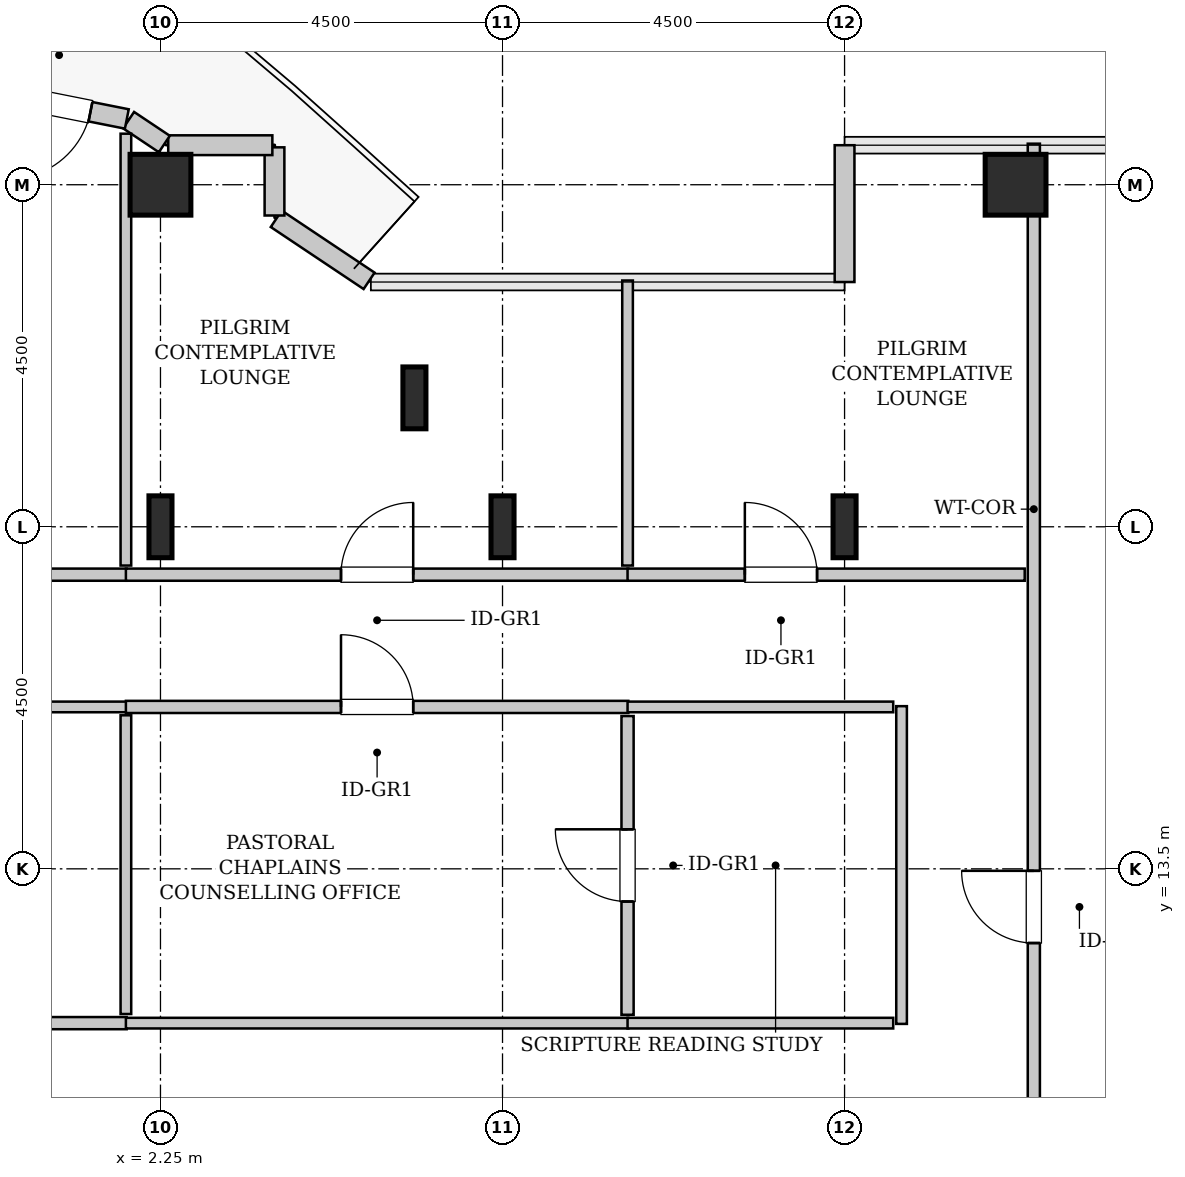
"""IFC4 building model, lengths in metres.
Left out: names, types, materials, properties, quantities, classifications, styles, units other than length and angle.
Written with IfcOpenShell. Run it as: python <this file> out.ifc"""

import sys

from ifc_helpers import new_model, si_unit, direction, frame, frame_2d, origin, origin_2d, place, context, subcontext, project, spatial, rectangle, hollow_rectangle, i_section, extrude, source, transform, mapped, element, fill, save


model = new_model("IFC4")
c1 = context("Model", 3, precision=1e-05, world=origin(), true_north=direction((0.0, 1.0)))
c2 = subcontext(c1, "Body", "Model", "MODEL_VIEW")
j1 = project(units=[si_unit("LENGTHUNIT", "METRE"), si_unit("PLANEANGLEUNIT", "RADIAN")], contexts=[c1])
p1 = place(None, origin())
s1 = spatial("IfcSite", under=j1, at=p1, CompositionType="ELEMENT")
p2 = place(p1, origin())
s2 = spatial("IfcBuilding", under=s1, at=p2, CompositionType="ELEMENT")
p3 = place(p2, frame((0.0, 0.0, 186.8)))
s3 = spatial("IfcBuildingStorey", under=s2, at=p3, CompositionType="ELEMENT", Elevation=186.8)
m1 = source(origin(), c2, "Body", "SweptSolid", [
    extrude(i_section(OverallWidth=0.303, OverallDepth=0.814, WebThickness=0.021, FlangeThickness=0.04, FilletRadius=0.03, at=origin_2d()), origin(), (0.0, 0.0, 1.0), 3.8),
])
p4 = place(p3, frame((2.25, 18.0, 0.0), z_axis=(0.0, 0.0, 1.0), x_axis=(1.0, 0.0, 0.0)))
e1 = element("IfcColumn", 1, at=p4, inside=s3, PredefinedType="COLUMN", context=c2, shape_type="MappedRepresentation", body=[
    mapped(m1, transform((0.0, 0.0, 0.0), x_axis=(1.0, 0.0, 0.0), y_axis=(0.0, 1.0, 0.0), z_axis=(0.0, 0.0, 1.0), scale=1.0)),
])
m2 = source(origin(), c2, "Body", "SweptSolid", [
    extrude(hollow_rectangle(XDim=0.8, YDim=0.8, WallThickness=0.04, InnerFilletRadius=0.04, OuterFilletRadius=0.08, at=origin_2d()), origin(), (0.0, 0.0, 1.0), 3.8),
])
p5 = place(p3, frame((2.25, 22.5, 0.0), z_axis=(0.0, 0.0, 1.0), x_axis=(1.0, 0.0, 0.0)))
e2 = element("IfcColumn", 2, at=p5, inside=s3, PredefinedType="COLUMN", context=c2, shape_type="MappedRepresentation", body=[
    mapped(m2, transform((0.0, 0.0, 0.0), x_axis=(1.0, 0.0, 0.0), y_axis=(0.0, 1.0, 0.0), z_axis=(0.0, 0.0, 1.0), scale=1.0)),
])
for number, where, z_axis, x_axis in (
    (3, (5.591, 19.696, 0.0), (0.0, 0.0, 1.0), (1.0, 0.0, 0.0)),
    (4, (6.75, 18.0, 0.0), (0.0, 0.0, 1.0), (1.0, 0.0, 0.0)),
    (5, (11.25, 18.0, 0.0), (0.0, 0.0, 1.0), (1.0, 0.0, 0.0)),
):
    element("IfcColumn", number, at=place(p3, frame(where, z_axis=z_axis, x_axis=x_axis)), inside=s3, PredefinedType="COLUMN", context=c2, shape_type="MappedRepresentation", body=[
        mapped(m1, transform((0.0, 0.0, 0.0), x_axis=(1.0, 0.0, 0.0), y_axis=(0.0, 1.0, 0.0), z_axis=(0.0, 0.0, 1.0), scale=1.0)),
    ])
p6 = place(p3, frame((13.5, 22.5, 0.0), z_axis=(0.0, 0.0, 1.0), x_axis=(1.0, 0.0, 0.0)))
e6 = element("IfcColumn", 6, at=p6, inside=s3, PredefinedType="COLUMN", context=c2, shape_type="MappedRepresentation", body=[
    mapped(m2, transform((0.0, 0.0, 0.0), x_axis=(1.0, 0.0, 0.0), y_axis=(0.0, 1.0, 0.0), z_axis=(0.0, 0.0, 1.0), scale=1.0)),
])
m3 = source(origin(), c2, "Body", "SweptSolid", [
    extrude(rectangle(XDim=1.8, YDim=0.26, at=frame_2d((0.9, 0.0))), origin(), (0.0, 0.0, 1.0), 3.55),
])
p7 = place(p3, frame((11.25, 23.02, 0.0), z_axis=(0.0, 0.0, 1.0), x_axis=(0.0, -1.0, 0.0)))
e7 = element("IfcWall", 7, at=p7, inside=s3, PredefinedType="SOLIDWALL", context=c2, shape_type="MappedRepresentation", body=[
    mapped(m3, transform((0.0, 0.0, 0.0), x_axis=(1.0, 0.0, 0.0), y_axis=(0.0, 1.0, 0.0), z_axis=(0.0, 0.0, 1.0), scale=1.0)),
])
m4 = source(origin(), c2, "Body", "SweptSolid", [
    extrude(rectangle(XDim=1.469, YDim=0.26, at=frame_2d((0.734, 0.0))), origin(), (0.0, 0.0, 1.0), 3.55),
])
p8 = place(p3, frame((4.995, 21.236, 0.0), z_axis=(0.0, 0.0, 1.0), x_axis=(-0.831461760506, 0.555581983884, 0.0)))
e8 = element("IfcWall", 8, at=p8, inside=s3, PredefinedType="SOLIDWALL", context=c2, shape_type="MappedRepresentation", body=[
    mapped(m4, transform((0.0, 0.0, 0.0), x_axis=(1.0, 0.0, 0.0), y_axis=(0.0, 1.0, 0.0), z_axis=(0.0, 0.0, 1.0), scale=1.0)),
])
m5 = source(origin(), c2, "Body", "SweptSolid", [
    extrude(rectangle(XDim=0.897, YDim=0.26, at=frame_2d((0.448, 0.0))), origin(), (0.0, 0.0, 1.0), 3.55),
])
p9 = place(p3, frame((3.75, 22.095, 0.0), z_axis=(0.0, 0.0, 1.0), x_axis=(0.0, 1.0, 0.0)))
e9 = element("IfcWall", 9, at=p9, inside=s3, PredefinedType="SOLIDWALL", context=c2, shape_type="MappedRepresentation", body=[
    mapped(m5, transform((0.0, 0.0, 0.0), x_axis=(1.0, 0.0, 0.0), y_axis=(0.0, 1.0, 0.0), z_axis=(0.0, 0.0, 1.0), scale=1.0)),
])
m6 = source(origin(), c2, "Body", "SweptSolid", [
    extrude(rectangle(XDim=1.37, YDim=0.26, at=frame_2d((0.685, 0.0))), origin(), (0.0, 0.0, 1.0), 3.55),
])
p10 = place(p3, frame((3.722, 23.02, 0.0), z_axis=(0.0, 0.0, 1.0), x_axis=(-1.0, 0.0, 0.0)))
e10 = element("IfcWall", 10, at=p10, inside=s3, PredefinedType="SOLIDWALL", context=c2, shape_type="MappedRepresentation", body=[
    mapped(m6, transform((0.0, 0.0, 0.0), x_axis=(1.0, 0.0, 0.0), y_axis=(0.0, 1.0, 0.0), z_axis=(0.0, 0.0, 1.0), scale=1.0)),
])
m7 = source(origin(), c2, "Body", "SweptSolid", [
    extrude(rectangle(XDim=0.565, YDim=0.26, at=frame_2d((0.283, 0.0))), origin(), (0.0, 0.0, 1.0), 3.55),
])
p11 = place(p3, frame((2.301, 23.036, 0.0), z_axis=(0.0, 0.0, 1.0), x_axis=(-0.831651492666, 0.555297933317, 0.0)))
e11 = element("IfcWall", 11, at=p11, inside=s3, PredefinedType="SOLIDWALL", context=c2, shape_type="MappedRepresentation", body=[
    mapped(m7, transform((0.0, 0.0, 0.0), x_axis=(1.0, 0.0, 0.0), y_axis=(0.0, 1.0, 0.0), z_axis=(0.0, 0.0, 1.0), scale=1.0)),
])
m8 = source(origin(), c2, "Body", "SweptSolid", [
    extrude(rectangle(XDim=4.137, YDim=0.26, at=frame_2d((2.068, 0.0))), origin(), (0.0, 0.0, 1.0), 3.55),
])
p12 = place(p3, frame((1.807, 23.365, 0.0), z_axis=(0.0, 0.0, 1.0), x_axis=(-0.980782170794, 0.195105954428, 0.0)))
e12 = element("IfcWall", 12, at=p12, inside=s3, PredefinedType="SOLIDWALL", context=c2, shape_type="MappedRepresentation", body=[
    mapped(m8, transform((0.0, 0.0, 0.0), x_axis=(1.0, 0.0, 0.0), y_axis=(0.0, 1.0, 0.0), z_axis=(0.0, 0.0, 1.0), scale=1.0)),
])
p13 = place(p12, frame((0.488, 0.0, 0.0)))
e13 = element("IfcOpeningElement", 13, at=p13, cuts=e12, PredefinedType="OPENING", context=c2, shape_type="SweptSolid", body=[
    extrude(rectangle(XDim=1.1, YDim=2.2, at=frame_2d((0.55, 1.1))), frame((0.0, 0.14, 0.0), z_axis=(0.0, -1.0, 0.0), x_axis=(1.0, 0.0, 0.0)), (0.0, 0.0, 1.0), 0.28),
])
m9 = source(origin(), c2, "Body", "SweptSolid", [
    extrude(rectangle(XDim=14.453, YDim=0.16, at=frame_2d((7.226, 0.0))), origin(), (0.0, 0.0, 1.0), 3.535),
])
p14 = place(p3, frame((13.74, 8.587, 0.0), z_axis=(0.0, 0.0, 1.0), x_axis=(0.0, 1.0, 0.0)))
e14 = element("IfcWall", 14, at=p14, inside=s3, PredefinedType="PARTITIONING", context=c2, shape_type="MappedRepresentation", body=[
    mapped(m9, transform((0.0, 0.0, 0.0), x_axis=(1.0, 0.0, 0.0), y_axis=(0.0, 1.0, 0.0), z_axis=(0.0, 0.0, 1.0), scale=1.0)),
])
p15 = place(p14, frame((3.936, 0.0, 0.0)))
e15 = element("IfcOpeningElement", 15, at=p15, cuts=e14, PredefinedType="OPENING", context=c2, shape_type="SweptSolid", body=[
    extrude(rectangle(XDim=0.95, YDim=2.1, at=frame_2d((0.475, 1.05))), frame((0.0, 0.09, 0.0), z_axis=(0.0, -1.0, 0.0), x_axis=(1.0, 0.0, 0.0)), (0.0, 0.0, 1.0), 0.18),
])
m10 = source(origin(), c2, "Body", "SweptSolid", [
    extrude(rectangle(XDim=13.815, YDim=0.16, at=frame_2d((6.907, 0.0))), origin(), (0.0, 0.0, 1.0), 3.535),
])
p16 = place(p3, frame((-12.01, 11.47, 0.0), z_axis=(0.0, 0.0, 1.0), x_axis=(1.0, 0.0, 0.0)))
e16 = element("IfcWall", 16, at=p16, inside=s3, PredefinedType="PARTITIONING", context=c2, shape_type="MappedRepresentation", body=[
    mapped(m10, transform((0.0, 0.0, 0.0), x_axis=(1.0, 0.0, 0.0), y_axis=(0.0, 1.0, 0.0), z_axis=(0.0, 0.0, 1.0), scale=1.0)),
])
p17 = place(p16, frame((6.433, 0.0, 0.0)))
e17 = element("IfcOpeningElement", 17, at=p17, cuts=e16, PredefinedType="OPENING", context=c2, shape_type="SweptSolid", body=[
    extrude(rectangle(XDim=0.95, YDim=2.1, at=frame_2d((0.475, 1.05))), frame((0.0, 0.09, 0.0), z_axis=(0.0, -1.0, 0.0), x_axis=(1.0, 0.0, 0.0)), (0.0, 0.0, 1.0), 0.18),
])
m11 = source(origin(), c2, "Body", "SweptSolid", [
    extrude(rectangle(XDim=13.815, YDim=0.14, at=frame_2d((6.907, 0.0))), origin(), (0.0, 0.0, 1.0), 3.535),
])
p18 = place(p3, frame((-12.01, 15.63, 0.0), z_axis=(0.0, 0.0, 1.0), x_axis=(1.0, 0.0, 0.0)))
e18 = element("IfcWall", 18, at=p18, inside=s3, PredefinedType="PARTITIONING", context=c2, shape_type="MappedRepresentation", body=[
    mapped(m11, transform((0.0, 0.0, 0.0), x_axis=(1.0, 0.0, 0.0), y_axis=(0.0, 1.0, 0.0), z_axis=(0.0, 0.0, 1.0), scale=1.0)),
])
m12 = source(origin(), c2, "Body", "SweptSolid", [
    extrude(rectangle(XDim=3.93, YDim=0.14, at=frame_2d((1.965, 0.0))), origin(), (0.0, 0.0, 1.0), 3.535),
])
p19 = place(p3, frame((1.795, 11.59, 0.0), z_axis=(0.0, 0.0, 1.0), x_axis=(0.0, 1.0, 0.0)))
e19 = element("IfcWall", 19, at=p19, inside=s3, PredefinedType="PARTITIONING", context=c2, shape_type="MappedRepresentation", body=[
    mapped(m12, transform((0.0, 0.0, 0.0), x_axis=(1.0, 0.0, 0.0), y_axis=(0.0, 1.0, 0.0), z_axis=(0.0, 0.0, 1.0), scale=1.0)),
])
m13 = source(origin(), c2, "Body", "SweptSolid", [
    extrude(rectangle(XDim=9.245, YDim=0.16, at=frame_2d((4.623, 0.0))), origin(), (0.0, 0.0, 1.0), 3.535),
])
p20 = place(p3, frame((-7.44, 17.37, 0.0), z_axis=(0.0, 0.0, 1.0), x_axis=(1.0, 0.0, 0.0)))
e20 = element("IfcWall", 20, at=p20, inside=s3, PredefinedType="PARTITIONING", context=c2, shape_type="MappedRepresentation", body=[
    mapped(m13, transform((0.0, 0.0, 0.0), x_axis=(1.0, 0.0, 0.0), y_axis=(0.0, 1.0, 0.0), z_axis=(0.0, 0.0, 1.0), scale=1.0)),
])
p21 = place(p20, frame((3.529, 0.0, 0.0)))
e21 = element("IfcOpeningElement", 21, at=p21, cuts=e20, PredefinedType="OPENING", context=c2, shape_type="SweptSolid", body=[
    extrude(rectangle(XDim=0.95, YDim=2.1, at=frame_2d((0.475, 1.05))), frame((0.0, 0.09, 0.0), z_axis=(0.0, -1.0, 0.0), x_axis=(1.0, 0.0, 0.0)), (0.0, 0.0, 1.0), 0.18),
])
m14 = source(origin(), c2, "Body", "SweptSolid", [
    extrude(rectangle(XDim=5.681, YDim=0.14, at=frame_2d((2.841, 0.0))), origin(), (0.0, 0.0, 1.0), 2.875),
])
p22 = place(p3, frame((1.795, 17.49, 0.0), z_axis=(0.0, 0.0, 1.0), x_axis=(0.0, 1.0, 0.0)))
e22 = element("IfcWall", 22, at=p22, inside=s3, PredefinedType="PARTITIONING", context=c2, shape_type="MappedRepresentation", body=[
    mapped(m14, transform((0.0, 0.0, 0.0), x_axis=(1.0, 0.0, 0.0), y_axis=(0.0, 1.0, 0.0), z_axis=(0.0, 0.0, 1.0), scale=1.0)),
])
m15 = source(origin(), c2, "Body", "SweptSolid", [
    extrude(rectangle(XDim=6.61, YDim=0.16, at=frame_2d((3.305, 0.0))), origin(), (0.0, 0.0, 1.0), 3.535),
])
p23 = place(p3, frame((1.795, 17.37, 0.0), z_axis=(0.0, 0.0, 1.0), x_axis=(1.0, 0.0, 0.0)))
e23 = element("IfcWall", 23, at=p23, inside=s3, PredefinedType="PARTITIONING", context=c2, shape_type="MappedRepresentation", body=[
    mapped(m15, transform((0.0, 0.0, 0.0), x_axis=(1.0, 0.0, 0.0), y_axis=(0.0, 1.0, 0.0), z_axis=(0.0, 0.0, 1.0), scale=1.0)),
])
p24 = place(p23, frame((2.83, 0.0, 0.0)))
e24 = element("IfcOpeningElement", 24, at=p24, cuts=e23, PredefinedType="OPENING", context=c2, shape_type="SweptSolid", body=[
    extrude(rectangle(XDim=0.95, YDim=2.1, at=frame_2d((0.475, 1.05))), frame((0.0, 0.09, 0.0), z_axis=(0.0, -1.0, 0.0), x_axis=(1.0, 0.0, 0.0)), (0.0, 0.0, 1.0), 0.18),
])
m16 = source(origin(), c2, "Body", "SweptSolid", [
    extrude(rectangle(XDim=3.75, YDim=0.14, at=frame_2d((1.875, 0.0))), origin(), (0.0, 0.0, 1.0), 3.535),
])
p25 = place(p3, frame((8.395, 17.49, 0.0), z_axis=(0.0, 0.0, 1.0), x_axis=(0.0, 1.0, 0.0)))
e25 = element("IfcWall", 25, at=p25, inside=s3, PredefinedType="PARTITIONING", context=c2, shape_type="MappedRepresentation", body=[
    mapped(m16, transform((0.0, 0.0, 0.0), x_axis=(1.0, 0.0, 0.0), y_axis=(0.0, 1.0, 0.0), z_axis=(0.0, 0.0, 1.0), scale=1.0)),
])
p26 = place(p3, frame((1.795, 15.63, 0.0), z_axis=(0.0, 0.0, 1.0), x_axis=(1.0, 0.0, 0.0)))
e26 = element("IfcWall", 26, at=p26, inside=s3, PredefinedType="PARTITIONING", context=c2, shape_type="MappedRepresentation", body=[
    mapped(m15, transform((0.0, 0.0, 0.0), x_axis=(1.0, 0.0, 0.0), y_axis=(0.0, 1.0, 0.0), z_axis=(0.0, 0.0, 1.0), scale=1.0)),
])
p27 = place(p26, frame((2.83, 0.0, 0.0)))
e27 = element("IfcOpeningElement", 27, at=p27, cuts=e26, PredefinedType="OPENING", context=c2, shape_type="SweptSolid", body=[
    extrude(rectangle(XDim=0.95, YDim=2.1, at=frame_2d((0.475, 1.05))), frame((0.0, 0.09, 0.0), z_axis=(0.0, -1.0, 0.0), x_axis=(1.0, 0.0, 0.0)), (0.0, 0.0, 1.0), 0.18),
])
m17 = source(origin(), c2, "Body", "SweptSolid", [
    extrude(rectangle(XDim=6.61, YDim=0.14, at=frame_2d((3.305, 0.0))), origin(), (0.0, 0.0, 1.0), 3.535),
])
p28 = place(p3, frame((1.795, 11.47, 0.0), z_axis=(0.0, 0.0, 1.0), x_axis=(1.0, 0.0, 0.0)))
e28 = element("IfcWall", 28, at=p28, inside=s3, PredefinedType="PARTITIONING", context=c2, shape_type="MappedRepresentation", body=[
    mapped(m17, transform((0.0, 0.0, 0.0), x_axis=(1.0, 0.0, 0.0), y_axis=(0.0, 1.0, 0.0), z_axis=(0.0, 0.0, 1.0), scale=1.0)),
])
m18 = source(origin(), c2, "Body", "SweptSolid", [
    extrude(rectangle(XDim=3.93, YDim=0.16, at=frame_2d((1.965, 0.0))), origin(), (0.0, 0.0, 1.0), 3.535),
])
p29 = place(p3, frame((8.395, 11.58, 0.0), z_axis=(0.0, 0.0, 1.0), x_axis=(0.0, 1.0, 0.0)))
e29 = element("IfcWall", 29, at=p29, inside=s3, PredefinedType="PARTITIONING", context=c2, shape_type="MappedRepresentation", body=[
    mapped(m18, transform((0.0, 0.0, 0.0), x_axis=(1.0, 0.0, 0.0), y_axis=(0.0, 1.0, 0.0), z_axis=(0.0, 0.0, 1.0), scale=1.0)),
])
p30 = place(p29, frame((1.49, 0.0, 0.0)))
e30 = element("IfcOpeningElement", 30, at=p30, cuts=e29, PredefinedType="OPENING", context=c2, shape_type="SweptSolid", body=[
    extrude(rectangle(XDim=0.95, YDim=2.1, at=frame_2d((0.475, 1.05))), frame((0.0, 0.09, 0.0), z_axis=(0.0, -1.0, 0.0), x_axis=(1.0, 0.0, 0.0)), (0.0, 0.0, 1.0), 0.18),
])
m19 = source(origin(), c2, "Body", "SweptSolid", [
    extrude(rectangle(XDim=5.225, YDim=0.16, at=frame_2d((2.613, 0.0))), origin(), (0.0, 0.0, 1.0), 3.535),
])
p31 = place(p3, frame((8.395, 17.37, 0.0), z_axis=(0.0, 0.0, 1.0), x_axis=(1.0, 0.0, 0.0)))
e31 = element("IfcWall", 31, at=p31, inside=s3, PredefinedType="PARTITIONING", context=c2, shape_type="MappedRepresentation", body=[
    mapped(m19, transform((0.0, 0.0, 0.0), x_axis=(1.0, 0.0, 0.0), y_axis=(0.0, 1.0, 0.0), z_axis=(0.0, 0.0, 1.0), scale=1.0)),
])
p32 = place(p31, frame((1.543, 0.0, 0.0)))
e32 = element("IfcOpeningElement", 32, at=p32, cuts=e31, PredefinedType="OPENING", context=c2, shape_type="SweptSolid", body=[
    extrude(rectangle(XDim=0.95, YDim=2.1, at=frame_2d((0.475, 1.05))), frame((0.0, 0.09, 0.0), z_axis=(0.0, -1.0, 0.0), x_axis=(1.0, 0.0, 0.0)), (0.0, 0.0, 1.0), 0.18),
])
m20 = source(origin(), c2, "Body", "SweptSolid", [
    extrude(rectangle(XDim=4.18, YDim=0.14, at=frame_2d((2.09, 0.0))), origin(), (0.0, 0.0, 1.0), 3.535),
])
p33 = place(p3, frame((12.0, 11.46, 0.0), z_axis=(0.0, 0.0, 1.0), x_axis=(0.0, 1.0, 0.0)))
e33 = element("IfcWall", 33, at=p33, inside=s3, PredefinedType="PARTITIONING", context=c2, shape_type="MappedRepresentation", body=[
    mapped(m20, transform((0.0, 0.0, 0.0), x_axis=(1.0, 0.0, 0.0), y_axis=(0.0, 1.0, 0.0), z_axis=(0.0, 0.0, 1.0), scale=1.0)),
])
m21 = source(origin(), c2, "Body", "SweptSolid", [
    extrude(rectangle(XDim=3.495, YDim=0.14, at=frame_2d((1.748, 0.0))), origin(), (0.0, 0.0, 1.0), 3.535),
])
for number, where, z_axis, x_axis in (
    (34, (8.395, 15.63, 0.0), (0.0, 0.0, 1.0), (1.0, 0.0, 0.0)),
    (35, (8.395, 11.47, 0.0), (0.0, 0.0, 1.0), (1.0, 0.0, 0.0)),
):
    element("IfcWall", number, at=place(p3, frame(where, z_axis=z_axis, x_axis=x_axis)), inside=s3, PredefinedType="PARTITIONING", context=c2, shape_type="MappedRepresentation", body=[
        mapped(m21, transform((0.0, 0.0, 0.0), x_axis=(1.0, 0.0, 0.0), y_axis=(0.0, 1.0, 0.0), z_axis=(0.0, 0.0, 1.0), scale=1.0)),
    ])
m22 = source(origin(), c2, "Body", "SweptSolid", [
    extrude(rectangle(XDim=1.1, YDim=2.2, at=frame_2d((0.55, 1.1))), frame((0.0, 0.025, 0.0), z_axis=(0.0, -1.0, 0.0), x_axis=(1.0, 0.0, 0.0)), (0.0, 0.0, 1.0), 0.05),
])
p34 = place(p13, origin())
e36 = element("IfcDoor", 36, at=p34, inside=s3, OperationType="SINGLE_SWING_RIGHT", PredefinedType="DOOR", context=c2, shape_type="MappedRepresentation", body=[
    mapped(m22, transform((0.0, 0.0, 0.0), x_axis=(1.0, 0.0, 0.0), y_axis=(0.0, 1.0, 0.0), z_axis=(0.0, 0.0, 1.0), scale=1.0)),
])
fill(e13, e36)
m23 = source(origin(), c2, "Body", "SweptSolid", [
    extrude(rectangle(XDim=0.95, YDim=2.1, at=frame_2d((0.475, 1.05))), frame((0.0, 0.025, 0.0), z_axis=(0.0, -1.0, 0.0), x_axis=(1.0, 0.0, 0.0)), (0.0, 0.0, 1.0), 0.05),
])
p35 = place(p15, origin())
e37 = element("IfcDoor", 37, at=p35, inside=s3, OperationType="SINGLE_SWING_RIGHT", PredefinedType="DOOR", context=c2, shape_type="MappedRepresentation", body=[
    mapped(m23, transform((0.0, 0.0, 0.0), x_axis=(1.0, 0.0, 0.0), y_axis=(0.0, 1.0, 0.0), z_axis=(0.0, 0.0, 1.0), scale=1.0)),
])
fill(e15, e37)
p36 = place(p24, origin())
e38 = element("IfcDoor", 38, at=p36, inside=s3, OperationType="SINGLE_SWING_RIGHT", PredefinedType="DOOR", context=c2, shape_type="MappedRepresentation", body=[
    mapped(m23, transform((0.0, 0.0, 0.0), x_axis=(1.0, 0.0, 0.0), y_axis=(0.0, 1.0, 0.0), z_axis=(0.0, 0.0, 1.0), scale=1.0)),
])
fill(e24, e38)
p37 = place(p27, origin())
e39 = element("IfcDoor", 39, at=p37, inside=s3, OperationType="SINGLE_SWING_LEFT", PredefinedType="DOOR", context=c2, shape_type="MappedRepresentation", body=[
    mapped(m23, transform((0.0, 0.0, 0.0), x_axis=(1.0, 0.0, 0.0), y_axis=(0.0, 1.0, 0.0), z_axis=(0.0, 0.0, 1.0), scale=1.0)),
])
fill(e27, e39)
p38 = place(p30, origin())
e40 = element("IfcDoor", 40, at=p38, inside=s3, OperationType="SINGLE_SWING_RIGHT", PredefinedType="DOOR", context=c2, shape_type="MappedRepresentation", body=[
    mapped(m23, transform((0.0, 0.0, 0.0), x_axis=(1.0, 0.0, 0.0), y_axis=(0.0, 1.0, 0.0), z_axis=(0.0, 0.0, 1.0), scale=1.0)),
])
fill(e30, e40)
p39 = place(p32, origin())
e41 = element("IfcDoor", 41, at=p39, inside=s3, OperationType="SINGLE_SWING_LEFT", PredefinedType="DOOR", context=c2, shape_type="MappedRepresentation", body=[
    mapped(m23, transform((0.0, 0.0, 0.0), x_axis=(1.0, 0.0, 0.0), y_axis=(0.0, 1.0, 0.0), z_axis=(0.0, 0.0, 1.0), scale=1.0)),
])
fill(e32, e41)
save(model, sys.argv[1])
